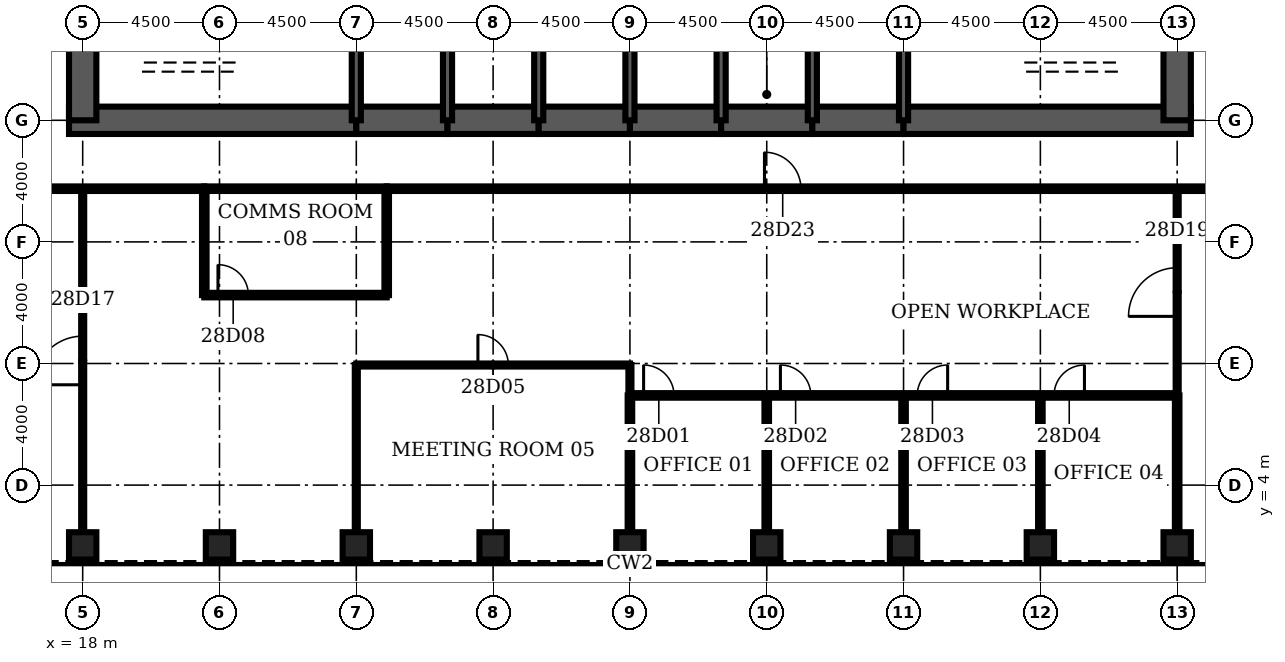
"""IFC4 building model, lengths in metres.
Left out: names, types, materials, properties, quantities, classifications, styles, units other than length and angle.
Written with IfcOpenShell. Run it as: python <this file> out.ifc"""

import sys

from ifc_helpers import new_model, si_unit, direction, frame, frame_2d, origin, origin_2d, place, context, subcontext, project, spatial, rectangle, hollow_rectangle, extrude, element, fill, save


model = new_model("IFC4")
c1 = context("Model", 3, precision=1e-05, world=origin(), true_north=direction((0.0, 1.0)))
c2 = subcontext(c1, "Body", "Model", "MODEL_VIEW")
j1 = project(units=[si_unit("LENGTHUNIT", "METRE"), si_unit("PLANEANGLEUNIT", "RADIAN")], contexts=[c1])
p1 = place(None, origin())
s1 = spatial("IfcSite", under=j1, at=p1, CompositionType="ELEMENT")
p2 = place(p1, origin())
s2 = spatial("IfcBuilding", under=s1, at=p2, CompositionType="ELEMENT")
p3 = place(p2, frame((0.0, 0.0, 129.9)))
s3 = spatial("IfcBuildingStorey", under=s2, at=p3, CompositionType="ELEMENT", Elevation=129.9)
for number, where, z_axis, x_axis in (
    (1, (18.0, 2.0, 0.0), (0.0, 0.0, 1.0), (0.0, 1.0, 0.0)),
    (2, (22.5, 2.0, 0.0), (0.0, 0.0, 1.0), (0.0, 1.0, 0.0)),
    (3, (27.0, 2.0, 0.0), (0.0, 0.0, 1.0), (0.0, 1.0, 0.0)),
    (4, (31.5, 2.0, 0.0), (0.0, 0.0, 1.0), (0.0, 1.0, 0.0)),
    (5, (36.0, 2.0, 0.0), (0.0, 0.0, 1.0), (0.0, 1.0, 0.0)),
    (6, (40.5, 2.0, 0.0), (0.0, 0.0, 1.0), (0.0, 1.0, 0.0)),
    (7, (45.0, 2.0, 0.0), (0.0, 0.0, 1.0), (0.0, 1.0, 0.0)),
    (8, (49.5, 2.0, 0.0), (0.0, 0.0, 1.0), (0.0, 1.0, 0.0)),
    (9, (54.0, 2.0, 0.0), (0.0, 0.0, 1.0), (0.0, 1.0, 0.0)),
):
    element("IfcColumn", number, at=place(p3, frame(where, z_axis=z_axis, x_axis=x_axis)), inside=s3, PredefinedType="COLUMN", context=c2, shape_type="SweptSolid", body=[
        extrude(hollow_rectangle(XDim=0.9, YDim=0.9, WallThickness=0.1, at=origin_2d()), origin(), (0.0, 0.0, 1.0), 4.2),
    ])
p4 = place(p3, frame((17.55, 16.0, 0.0), z_axis=(0.0, 0.0, 1.0), x_axis=(1.0, 0.0, 0.0)))
e10 = element("IfcWall", 10, at=p4, inside=s3, PredefinedType="SHEAR", context=c2, shape_type="SweptSolid", body=[
    extrude(rectangle(XDim=9.45, YDim=0.9, at=frame_2d((4.725, 0.0))), origin(), (0.0, 0.0, 1.0), 4.2),
])
for number, where, z_axis, x_axis in (
    (11, (27.0, 16.0, 0.0), (0.0, 0.0, 1.0), (1.0, 0.0, 0.0)),
    (12, (30.0, 16.0, 0.0), (0.0, 0.0, 1.0), (1.0, 0.0, 0.0)),
    (13, (33.0, 16.0, 0.0), (0.0, 0.0, 1.0), (1.0, 0.0, 0.0)),
    (14, (36.0, 16.0, 0.0), (0.0, 0.0, 1.0), (1.0, 0.0, 0.0)),
    (15, (39.0, 16.0, 0.0), (0.0, 0.0, 1.0), (1.0, 0.0, 0.0)),
    (16, (42.0, 16.0, 0.0), (0.0, 0.0, 1.0), (1.0, 0.0, 0.0)),
):
    element("IfcWall", number, at=place(p3, frame(where, z_axis=z_axis, x_axis=x_axis)), inside=s3, PredefinedType="SHEAR", context=c2, shape_type="SweptSolid", body=[
        extrude(rectangle(XDim=3.0, YDim=0.9, at=frame_2d((1.5, 0.0))), origin(), (0.0, 0.0, 1.0), 4.2),
    ])
p5 = place(p3, frame((45.0, 16.0, 0.0), z_axis=(0.0, 0.0, 1.0), x_axis=(1.0, 0.0, 0.0)))
e17 = element("IfcWall", 17, at=p5, inside=s3, PredefinedType="SHEAR", context=c2, shape_type="SweptSolid", body=[
    extrude(rectangle(XDim=9.45, YDim=0.9, at=frame_2d((4.725, 0.0))), origin(), (0.0, 0.0, 1.0), 4.2),
])
for number, where, z_axis, x_axis in (
    (18, (18.0, 19.2, 0.0), (0.0, 0.0, 1.0), (0.0, -1.0, 0.0)),
    (19, (54.0, 16.0, 0.0), (0.0, 0.0, 1.0), (0.0, 1.0, 0.0)),
):
    element("IfcWall", number, at=place(p3, frame(where, z_axis=z_axis, x_axis=x_axis)), inside=s3, PredefinedType="SHEAR", context=c2, shape_type="SweptSolid", body=[
        extrude(rectangle(XDim=3.2, YDim=0.9, at=frame_2d((1.6, 0.0))), origin(), (0.0, 0.0, 1.0), 4.2),
    ])
for number, where, z_axis, x_axis in (
    (20, (27.0, 16.0, 0.0), (0.0, 0.0, 1.0), (0.0, 1.0, 0.0)),
    (21, (30.0, 16.0, 0.0), (0.0, 0.0, 1.0), (0.0, 1.0, 0.0)),
    (22, (33.0, 16.0, 0.0), (0.0, 0.0, 1.0), (0.0, 1.0, 0.0)),
    (23, (36.0, 16.0, 0.0), (0.0, 0.0, 1.0), (0.0, 1.0, 0.0)),
    (24, (39.0, 16.0, 0.0), (0.0, 0.0, 1.0), (0.0, 1.0, 0.0)),
    (25, (42.0, 16.0, 0.0), (0.0, 0.0, 1.0), (0.0, 1.0, 0.0)),
    (26, (45.0, 16.0, 0.0), (0.0, 0.0, 1.0), (0.0, 1.0, 0.0)),
):
    element("IfcWall", number, at=place(p3, frame(where, z_axis=z_axis, x_axis=x_axis)), inside=s3, PredefinedType="SOLIDWALL", context=c2, shape_type="SweptSolid", body=[
        extrude(rectangle(XDim=3.2, YDim=0.3, at=frame_2d((1.6, 0.0))), origin(), (0.0, 0.0, 1.0), 4.2),
    ])
p6 = place(p3, frame((39.15, 17.4, 0.0), z_axis=(0.0, 0.0, 1.0), x_axis=(1.0, 0.0, 0.0)))
e27 = element("IfcWall", 27, at=p6, inside=s3, PredefinedType="SOLIDWALL", context=c2, shape_type="SweptSolid", body=[
    extrude(rectangle(XDim=2.7, YDim=0.3, at=frame_2d((1.35, 0.0))), origin(), (0.0, 0.0, 1.0), 4.04),
])
p7 = place(p6, frame((0.85, 0.0, 0.0)))
e28 = element("IfcOpeningElement", 28, at=p7, cuts=e27, PredefinedType="OPENING", context=c2, shape_type="SweptSolid", body=[
    extrude(rectangle(XDim=1.0, YDim=2.1, at=frame_2d((0.5, 1.05))), frame((0.0, 0.16, 0.0), z_axis=(0.0, -1.0, 0.0), x_axis=(1.0, 0.0, 0.0)), (0.0, 0.0, 1.0), 0.32),
])
p8 = place(p3, frame((36.0, 6.95, 0.0), z_axis=(0.0, 0.0, 1.0), x_axis=(1.0, 0.0, 0.0)))
e29 = element("IfcWall", 29, at=p8, inside=s3, PredefinedType="PARTITIONING", context=c2, shape_type="SweptSolid", body=[
    extrude(rectangle(XDim=18.0, YDim=0.15, at=frame_2d((9.0, 0.0))), origin(), (0.0, 0.0, 1.0), 3.0),
])
p9 = place(p8, frame((0.45, 0.0, 0.0)))
e30 = element("IfcOpeningElement", 30, at=p9, cuts=e29, PredefinedType="OPENING", context=c2, shape_type="SweptSolid", body=[
    extrude(rectangle(XDim=1.0, YDim=2.1, at=frame_2d((0.5, 1.05))), frame((0.0, 0.085, 0.0), z_axis=(0.0, -1.0, 0.0), x_axis=(1.0, 0.0, 0.0)), (0.0, 0.0, 1.0), 0.17),
])
p10 = place(p8, frame((4.95, 0.0, 0.0)))
e31 = element("IfcOpeningElement", 31, at=p10, cuts=e29, PredefinedType="OPENING", context=c2, shape_type="SweptSolid", body=[
    extrude(rectangle(XDim=1.0, YDim=2.1, at=frame_2d((0.5, 1.05))), frame((0.0, 0.085, 0.0), z_axis=(0.0, -1.0, 0.0), x_axis=(1.0, 0.0, 0.0)), (0.0, 0.0, 1.0), 0.17),
])
p11 = place(p8, frame((9.45, 0.0, 0.0)))
e32 = element("IfcOpeningElement", 32, at=p11, cuts=e29, PredefinedType="OPENING", context=c2, shape_type="SweptSolid", body=[
    extrude(rectangle(XDim=1.0, YDim=2.1, at=frame_2d((0.5, 1.05))), frame((0.0, 0.085, 0.0), z_axis=(0.0, -1.0, 0.0), x_axis=(1.0, 0.0, 0.0)), (0.0, 0.0, 1.0), 0.17),
])
p12 = place(p8, frame((13.95, 0.0, 0.0)))
e33 = element("IfcOpeningElement", 33, at=p12, cuts=e29, PredefinedType="OPENING", context=c2, shape_type="SweptSolid", body=[
    extrude(rectangle(XDim=1.0, YDim=2.1, at=frame_2d((0.5, 1.05))), frame((0.0, 0.085, 0.0), z_axis=(0.0, -1.0, 0.0), x_axis=(1.0, 0.0, 0.0)), (0.0, 0.0, 1.0), 0.17),
])
p13 = place(p3, frame((27.0, 7.95, 0.0), z_axis=(0.0, 0.0, 1.0), x_axis=(1.0, 0.0, 0.0)))
e34 = element("IfcWall", 34, at=p13, inside=s3, PredefinedType="PARTITIONING", context=c2, shape_type="SweptSolid", body=[
    extrude(rectangle(XDim=9.0, YDim=0.1, at=frame_2d((4.5, 0.0))), origin(), (0.0, 0.0, 1.0), 3.0),
])
p14 = place(p13, frame((4.0, 0.0, 0.0)))
e35 = element("IfcOpeningElement", 35, at=p14, cuts=e34, PredefinedType="OPENING", context=c2, shape_type="SweptSolid", body=[
    extrude(rectangle(XDim=1.0, YDim=2.1, at=frame_2d((0.5, 1.05))), frame((0.0, 0.06, 0.0), z_axis=(0.0, -1.0, 0.0), x_axis=(1.0, 0.0, 0.0)), (0.0, 0.0, 1.0), 0.12),
])
p15 = place(p3, frame((22.0, 10.25, 0.0), z_axis=(0.0, 0.0, 1.0), x_axis=(1.0, 0.0, 0.0)))
e36 = element("IfcWall", 36, at=p15, inside=s3, PredefinedType="PARTITIONING", context=c2, shape_type="SweptSolid", body=[
    extrude(rectangle(XDim=6.0, YDim=0.15, at=frame_2d((3.0, 0.0))), origin(), (0.0, 0.0, 1.0), 3.0),
])
p16 = place(p15, frame((0.45, 0.0, 0.0)))
e37 = element("IfcOpeningElement", 37, at=p16, cuts=e36, PredefinedType="OPENING", context=c2, shape_type="SweptSolid", body=[
    extrude(rectangle(XDim=1.0, YDim=2.1, at=frame_2d((0.5, 1.05))), frame((0.0, 0.085, 0.0), z_axis=(0.0, -1.0, 0.0), x_axis=(1.0, 0.0, 0.0)), (0.0, 0.0, 1.0), 0.17),
])
p17 = place(p3, frame((15.15, 13.75, 0.0), z_axis=(0.0, 0.0, 1.0), x_axis=(1.0, 0.0, 0.0)))
e38 = element("IfcWall", 38, at=p17, inside=s3, PredefinedType="PARTITIONING", context=c2, shape_type="SweptSolid", body=[
    extrude(rectangle(XDim=6.85, YDim=0.15, at=frame_2d((3.425, 0.0))), origin(), (0.0, 0.0, 1.0), 3.0),
])
p18 = place(p3, frame((22.0, 13.75, 0.0), z_axis=(0.0, 0.0, 1.0), x_axis=(1.0, 0.0, 0.0)))
e39 = element("IfcWall", 39, at=p18, inside=s3, PredefinedType="PARTITIONING", context=c2, shape_type="SweptSolid", body=[
    extrude(rectangle(XDim=6.0, YDim=0.15, at=frame_2d((3.0, 0.0))), origin(), (0.0, 0.0, 1.0), 3.0),
])
p19 = place(p3, frame((28.0, 13.75, 0.0), z_axis=(0.0, 0.0, 1.0), x_axis=(1.0, 0.0, 0.0)))
e40 = element("IfcWall", 40, at=p19, inside=s3, PredefinedType="PARTITIONING", context=c2, shape_type="SweptSolid", body=[
    extrude(rectangle(XDim=28.85, YDim=0.15, at=frame_2d((14.425, 0.0))), origin(), (0.0, 0.0, 1.0), 3.0),
])
p20 = place(p19, frame((12.425, 0.0, 0.0)))
e41 = element("IfcOpeningElement", 41, at=p20, cuts=e40, PredefinedType="OPENING", context=c2, shape_type="SweptSolid", body=[
    extrude(rectangle(XDim=1.2, YDim=2.1, at=frame_2d((0.6, 1.05))), frame((0.0, 0.085, 0.0), z_axis=(0.0, -1.0, 0.0), x_axis=(1.0, 0.0, 0.0)), (0.0, 0.0, 1.0), 0.17),
])
p21 = place(p3, frame((18.0, 2.45, 0.0), z_axis=(0.0, 0.0, 1.0), x_axis=(0.0, 1.0, 0.0)))
e42 = element("IfcWall", 42, at=p21, inside=s3, PredefinedType="PARTITIONING", context=c2, shape_type="SweptSolid", body=[
    extrude(rectangle(XDim=11.3, YDim=0.1, at=frame_2d((5.65, 0.0))), origin(), (0.0, 0.0, 1.0), 3.0),
])
p22 = place(p21, frame((4.85, 0.0, 0.0)))
e43 = element("IfcOpeningElement", 43, at=p22, cuts=e42, PredefinedType="OPENING", context=c2, shape_type="SweptSolid", body=[
    extrude(rectangle(XDim=1.6, YDim=2.1, at=frame_2d((0.8, 1.05))), frame((0.0, 0.06, 0.0), z_axis=(0.0, -1.0, 0.0), x_axis=(1.0, 0.0, 0.0)), (0.0, 0.0, 1.0), 0.12),
])
p23 = place(p3, frame((22.0, 10.25, 0.0), z_axis=(0.0, 0.0, 1.0), x_axis=(0.0, 1.0, 0.0)))
e44 = element("IfcWall", 44, at=p23, inside=s3, PredefinedType="PARTITIONING", context=c2, shape_type="SweptSolid", body=[
    extrude(rectangle(XDim=3.5, YDim=0.15, at=frame_2d((1.75, 0.0))), origin(), (0.0, 0.0, 1.0), 3.0),
])
p24 = place(p3, frame((27.0, 2.45, 0.0), z_axis=(0.0, 0.0, 1.0), x_axis=(0.0, 1.0, 0.0)))
e45 = element("IfcWall", 45, at=p24, inside=s3, PredefinedType="PARTITIONING", context=c2, shape_type="SweptSolid", body=[
    extrude(rectangle(XDim=5.5, YDim=0.1, at=frame_2d((2.75, 0.0))), origin(), (0.0, 0.0, 1.0), 3.0),
])
p25 = place(p3, frame((28.0, 10.25, 0.0), z_axis=(0.0, 0.0, 1.0), x_axis=(0.0, 1.0, 0.0)))
e46 = element("IfcWall", 46, at=p25, inside=s3, PredefinedType="PARTITIONING", context=c2, shape_type="SweptSolid", body=[
    extrude(rectangle(XDim=3.5, YDim=0.15, at=frame_2d((1.75, 0.0))), origin(), (0.0, 0.0, 1.0), 3.0),
])
p26 = place(p3, frame((36.0, 2.45, 0.0), z_axis=(0.0, 0.0, 1.0), x_axis=(0.0, 1.0, 0.0)))
e47 = element("IfcWall", 47, at=p26, inside=s3, PredefinedType="PARTITIONING", context=c2, shape_type="SweptSolid", body=[
    extrude(rectangle(XDim=4.5, YDim=0.15, at=frame_2d((2.25, 0.0))), origin(), (0.0, 0.0, 1.0), 3.0),
])
p27 = place(p3, frame((36.0, 6.95, 0.0), z_axis=(0.0, 0.0, 1.0), x_axis=(0.0, 1.0, 0.0)))
e48 = element("IfcWall", 48, at=p27, inside=s3, PredefinedType="PARTITIONING", context=c2, shape_type="SweptSolid", body=[
    extrude(rectangle(XDim=1.0, YDim=0.1, at=frame_2d((0.5, 0.0))), origin(), (0.0, 0.0, 1.0), 3.0),
])
for number, where, z_axis, x_axis in (
    (49, (40.5, 2.45, 0.0), (0.0, 0.0, 1.0), (0.0, 1.0, 0.0)),
    (50, (45.0, 2.45, 0.0), (0.0, 0.0, 1.0), (0.0, 1.0, 0.0)),
    (51, (49.5, 2.45, 0.0), (0.0, 0.0, 1.0), (0.0, 1.0, 0.0)),
    (52, (54.0, 2.45, 0.0), (0.0, 0.0, 1.0), (0.0, 1.0, 0.0)),
):
    element("IfcWall", number, at=place(p3, frame(where, z_axis=z_axis, x_axis=x_axis)), inside=s3, PredefinedType="PARTITIONING", context=c2, shape_type="SweptSolid", body=[
        extrude(rectangle(XDim=4.5, YDim=0.15, at=frame_2d((2.25, 0.0))), origin(), (0.0, 0.0, 1.0), 3.0),
    ])
p28 = place(p3, frame((54.0, 6.95, 0.0), z_axis=(0.0, 0.0, 1.0), x_axis=(0.0, 1.0, 0.0)))
e53 = element("IfcWall", 53, at=p28, inside=s3, PredefinedType="PARTITIONING", context=c2, shape_type="SweptSolid", body=[
    extrude(rectangle(XDim=6.8, YDim=0.1, at=frame_2d((3.4, 0.0))), origin(), (0.0, 0.0, 1.0), 3.0),
])
p29 = place(p28, frame((2.6, 0.0, 0.0)))
e54 = element("IfcOpeningElement", 54, at=p29, cuts=e53, PredefinedType="OPENING", context=c2, shape_type="SweptSolid", body=[
    extrude(rectangle(XDim=1.6, YDim=2.1, at=frame_2d((0.8, 1.05))), frame((0.0, 0.06, 0.0), z_axis=(0.0, -1.0, 0.0), x_axis=(1.0, 0.0, 0.0)), (0.0, 0.0, 1.0), 0.12),
])
p30 = place(p7, origin())
e55 = element("IfcDoor", 55, at=p30, inside=s3, OperationType="SINGLE_SWING_LEFT", PredefinedType="DOOR", context=c2, shape_type="SweptSolid", body=[
    extrude(rectangle(XDim=1.0, YDim=2.1, at=frame_2d((0.5, 1.05))), frame((0.0, 0.025, 0.0), z_axis=(0.0, -1.0, 0.0), x_axis=(1.0, 0.0, 0.0)), (0.0, 0.0, 1.0), 0.05),
])
fill(e28, e55)
p31 = place(p9, origin())
e56 = element("IfcDoor", 56, at=p31, inside=s3, OperationType="SINGLE_SWING_LEFT", PredefinedType="DOOR", context=c2, shape_type="SweptSolid", body=[
    extrude(rectangle(XDim=1.0, YDim=2.1, at=frame_2d((0.5, 1.05))), frame((0.0, 0.025, 0.0), z_axis=(0.0, -1.0, 0.0), x_axis=(1.0, 0.0, 0.0)), (0.0, 0.0, 1.0), 0.05),
])
fill(e30, e56)
p32 = place(p10, origin())
e57 = element("IfcDoor", 57, at=p32, inside=s3, OperationType="SINGLE_SWING_LEFT", PredefinedType="DOOR", context=c2, shape_type="SweptSolid", body=[
    extrude(rectangle(XDim=1.0, YDim=2.1, at=frame_2d((0.5, 1.05))), frame((0.0, 0.025, 0.0), z_axis=(0.0, -1.0, 0.0), x_axis=(1.0, 0.0, 0.0)), (0.0, 0.0, 1.0), 0.05),
])
fill(e31, e57)
p33 = place(p11, origin())
e58 = element("IfcDoor", 58, at=p33, inside=s3, OperationType="SINGLE_SWING_RIGHT", PredefinedType="DOOR", context=c2, shape_type="SweptSolid", body=[
    extrude(rectangle(XDim=1.0, YDim=2.1, at=frame_2d((0.5, 1.05))), frame((0.0, 0.025, 0.0), z_axis=(0.0, -1.0, 0.0), x_axis=(1.0, 0.0, 0.0)), (0.0, 0.0, 1.0), 0.05),
])
fill(e32, e58)
p34 = place(p12, origin())
e59 = element("IfcDoor", 59, at=p34, inside=s3, OperationType="SINGLE_SWING_RIGHT", PredefinedType="DOOR", context=c2, shape_type="SweptSolid", body=[
    extrude(rectangle(XDim=1.0, YDim=2.1, at=frame_2d((0.5, 1.05))), frame((0.0, 0.025, 0.0), z_axis=(0.0, -1.0, 0.0), x_axis=(1.0, 0.0, 0.0)), (0.0, 0.0, 1.0), 0.05),
])
fill(e33, e59)
p35 = place(p14, origin())
e60 = element("IfcDoor", 60, at=p35, inside=s3, OperationType="SINGLE_SWING_LEFT", PredefinedType="DOOR", context=c2, shape_type="SweptSolid", body=[
    extrude(rectangle(XDim=1.0, YDim=2.1, at=frame_2d((0.5, 1.05))), frame((0.0, 0.025, 0.0), z_axis=(0.0, -1.0, 0.0), x_axis=(1.0, 0.0, 0.0)), (0.0, 0.0, 1.0), 0.05),
])
fill(e35, e60)
p36 = place(p16, origin())
e61 = element("IfcDoor", 61, at=p36, inside=s3, OperationType="SINGLE_SWING_LEFT", PredefinedType="DOOR", context=c2, shape_type="SweptSolid", body=[
    extrude(rectangle(XDim=1.0, YDim=2.1, at=frame_2d((0.5, 1.05))), frame((0.0, 0.025, 0.0), z_axis=(0.0, -1.0, 0.0), x_axis=(1.0, 0.0, 0.0)), (0.0, 0.0, 1.0), 0.05),
])
fill(e37, e61)
p37 = place(p22, origin())
e62 = element("IfcDoor", 62, at=p37, inside=s3, OperationType="SINGLE_SWING_LEFT", PredefinedType="DOOR", context=c2, shape_type="SweptSolid", body=[
    extrude(rectangle(XDim=1.6, YDim=2.1, at=frame_2d((0.8, 1.05))), frame((0.0, 0.025, 0.0), z_axis=(0.0, -1.0, 0.0), x_axis=(1.0, 0.0, 0.0)), (0.0, 0.0, 1.0), 0.05),
])
fill(e43, e62)
p38 = place(p29, origin())
e63 = element("IfcDoor", 63, at=p38, inside=s3, OperationType="SINGLE_SWING_LEFT", PredefinedType="DOOR", context=c2, shape_type="SweptSolid", body=[
    extrude(rectangle(XDim=1.6, YDim=2.1, at=frame_2d((0.8, 1.05))), frame((0.0, 0.025, 0.0), z_axis=(0.0, -1.0, 0.0), x_axis=(1.0, 0.0, 0.0)), (0.0, 0.0, 1.0), 0.05),
])
fill(e54, e63)
p39 = place(p20, origin())
e64 = element("IfcDoor", 64, at=p39, inside=s3, OperationType="SINGLE_SWING_LEFT", PredefinedType="DOOR", context=c2, shape_type="SweptSolid", body=[
    extrude(rectangle(XDim=1.2, YDim=2.1, at=frame_2d((0.6, 1.05))), frame((0.0, 0.025, 0.0), z_axis=(0.0, -1.0, 0.0), x_axis=(1.0, 0.0, 0.0)), (0.0, 0.0, 1.0), 0.05),
])
fill(e41, e64)
save(model, sys.argv[1])
